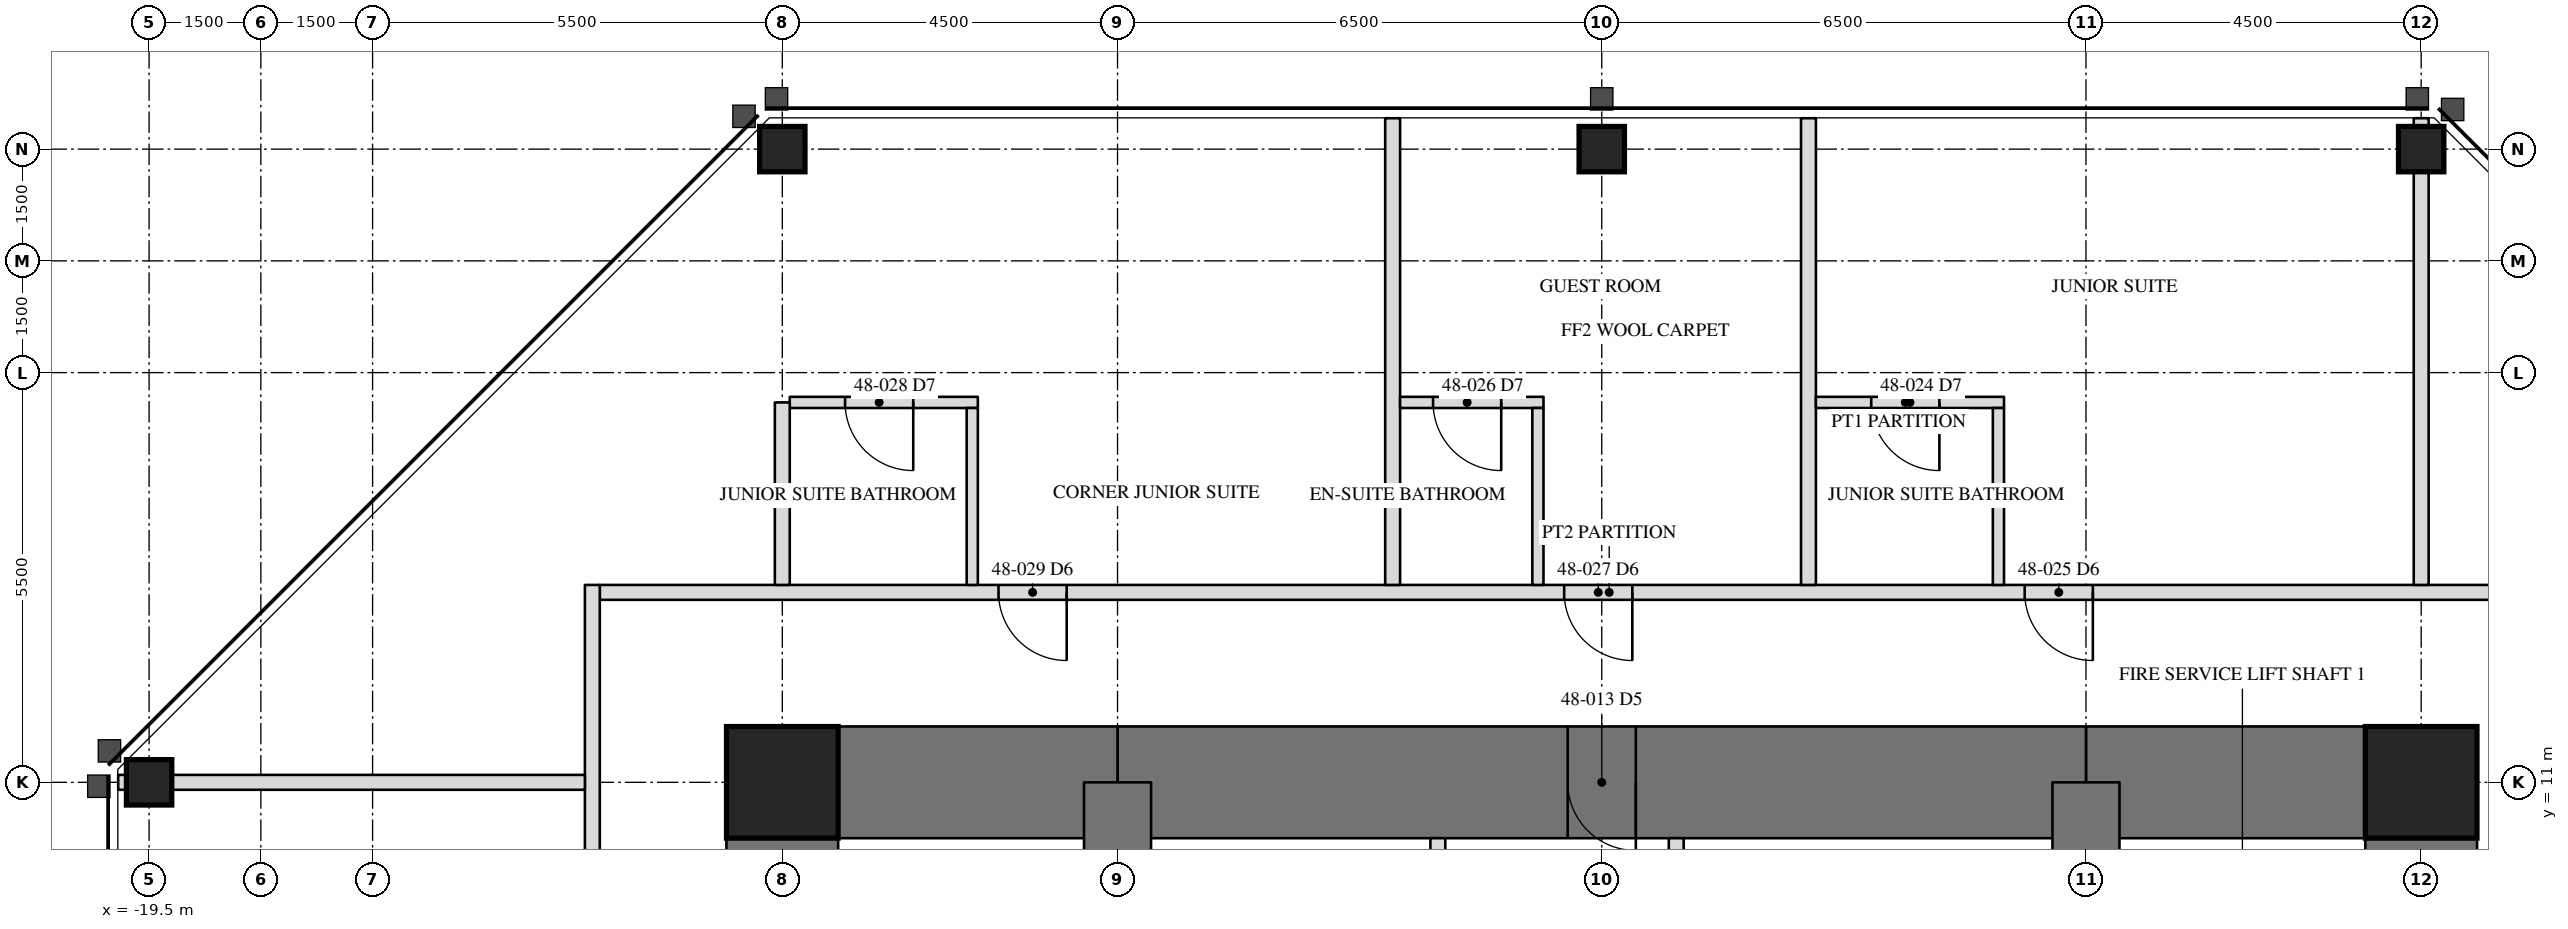
"""IFC4 building model, lengths in metres.
Left out: names, types, materials, properties, quantities, classifications, styles, units other than length and angle.
Written with IfcOpenShell. Run it as: python <this file> out.ifc"""

import sys

from ifc_helpers import new_model, si_unit, direction, frame, frame_2d, origin, origin_2d, place, context, subcontext, project, spatial, rectangle, hollow_rectangle, extrude, element, fill, save


model = new_model("IFC4")
c1 = context("Model", 3, precision=1e-05, world=origin(), true_north=direction((0.0, 1.0)))
c2 = subcontext(c1, "Body", "Model", "MODEL_VIEW")
j1 = project(units=[si_unit("LENGTHUNIT", "METRE"), si_unit("PLANEANGLEUNIT", "RADIAN")], contexts=[c1])
p1 = place(None, origin())
s1 = spatial("IfcSite", under=j1, at=p1, CompositionType="ELEMENT")
p2 = place(p1, origin())
s2 = spatial("IfcBuilding", under=s1, at=p2, CompositionType="ELEMENT")
p3 = place(p2, frame((0.0, 0.0, 204.7)))
s3 = spatial("IfcBuildingStorey", under=s2, at=p3, CompositionType="ELEMENT", Elevation=204.7)
for number, where, z_axis, x_axis in (
    (1, (11.0, 19.5, 0.0), (0.0, 0.0, 1.0), (1.0, 0.0, 0.0)),
    (2, (0.0, 19.5, 0.0), (0.0, 0.0, 1.0), (1.0, 0.0, 0.0)),
    (3, (-11.0, 19.5, 0.0), (0.0, 0.0, 1.0), (1.0, 0.0, 0.0)),
    (4, (-19.5, 11.0, 0.0), (0.0, 0.0, 1.0), (0.0, 1.0, 0.0)),
):
    element("IfcColumn", number, at=place(p3, frame(where, z_axis=z_axis, x_axis=x_axis)), inside=s3, PredefinedType="COLUMN", context=c2, shape_type="SweptSolid", body=[
        extrude(hollow_rectangle(XDim=0.61, YDim=0.61, WallThickness=0.076, at=origin_2d()), origin(), (0.0, 0.0, 1.0), 3.5),
    ])
p4 = place(p3, frame((11.0, -11.0, 0.0), z_axis=(0.0, 0.0, 1.0), x_axis=(0.0, 1.0, 0.0)))
e5 = element("IfcWall", 5, at=p4, inside=s3, PredefinedType="SHEAR", context=c2, shape_type="SweptSolid", body=[
    extrude(rectangle(XDim=22.0, YDim=1.5, at=frame_2d((11.0, 0.0))), origin(), (0.0, 0.0, 1.0), 3.5),
])
p5 = place(p4, frame((15.393, 0.0, 0.0)))
e6 = element("IfcOpeningElement", 6, at=p5, cuts=e5, PredefinedType="OPENING", context=c2, shape_type="SweptSolid", body=[
    extrude(rectangle(XDim=0.915, YDim=2.134, at=frame_2d((0.458, 1.067))), frame((0.0, 0.76, 0.0), z_axis=(0.0, -1.0, 0.0), x_axis=(1.0, 0.0, 0.0)), (0.0, 0.0, 1.0), 1.52),
])
p6 = place(p3, frame((-11.0, 11.0, 0.0), z_axis=(0.0, 0.0, 1.0), x_axis=(0.0, -1.0, 0.0)))
e7 = element("IfcWall", 7, at=p6, inside=s3, PredefinedType="SHEAR", context=c2, shape_type="SweptSolid", body=[
    extrude(rectangle(XDim=22.0, YDim=1.5, at=frame_2d((11.0, 0.0))), origin(), (0.0, 0.0, 1.0), 3.5),
])
p7 = place(p6, frame((15.393, 0.0, 0.0)))
e8 = element("IfcOpeningElement", 8, at=p7, cuts=e7, PredefinedType="OPENING", context=c2, shape_type="SweptSolid", body=[
    extrude(rectangle(XDim=0.915, YDim=2.134, at=frame_2d((0.458, 1.067))), frame((0.0, 0.76, 0.0), z_axis=(0.0, -1.0, 0.0), x_axis=(1.0, 0.0, 0.0)), (0.0, 0.0, 1.0), 1.52),
])
p8 = place(p3, frame((11.0, 11.0, 0.0), z_axis=(0.0, 0.0, 1.0), x_axis=(-1.0, 0.0, 0.0)))
e9 = element("IfcWall", 9, at=p8, inside=s3, PredefinedType="SHEAR", context=c2, shape_type="SweptSolid", body=[
    extrude(rectangle(XDim=4.5, YDim=1.5, at=frame_2d((2.25, 0.0))), origin(), (0.0, 0.0, 1.0), 3.5),
])
p9 = place(p3, frame((6.5, 11.0, 0.0), z_axis=(0.0, 0.0, 1.0), x_axis=(-1.0, 0.0, 0.0)))
e10 = element("IfcWall", 10, at=p9, inside=s3, PredefinedType="SHEAR", context=c2, shape_type="SweptSolid", body=[
    extrude(rectangle(XDim=13.0, YDim=1.5, at=frame_2d((6.5, 0.0))), origin(), (0.0, 0.0, 1.0), 3.5),
])
p10 = place(p9, frame((6.042, 0.0, 0.0)))
e11 = element("IfcOpeningElement", 11, at=p10, cuts=e10, PredefinedType="OPENING", context=c2, shape_type="SweptSolid", body=[
    extrude(rectangle(XDim=0.915, YDim=2.134, at=frame_2d((0.458, 1.067))), frame((0.0, 0.76, 0.0), z_axis=(0.0, -1.0, 0.0), x_axis=(1.0, 0.0, 0.0)), (0.0, 0.0, 1.0), 1.52),
])
p11 = place(p3, frame((-6.5, 11.0, 0.0), z_axis=(0.0, 0.0, 1.0), x_axis=(-1.0, 0.0, 0.0)))
e12 = element("IfcWall", 12, at=p11, inside=s3, PredefinedType="SHEAR", context=c2, shape_type="SweptSolid", body=[
    extrude(rectangle(XDim=4.5, YDim=1.5, at=frame_2d((2.25, 0.0))), origin(), (0.0, 0.0, 1.0), 3.5),
])
for number, where, z_axis, x_axis in (
    (13, (6.5, 6.5, 0.0), (0.0, 0.0, 1.0), (0.0, 1.0, 0.0)),
    (14, (-6.5, 11.0, 0.0), (0.0, 0.0, 1.0), (0.0, -1.0, 0.0)),
):
    element("IfcWall", number, at=place(p3, frame(where, z_axis=z_axis, x_axis=x_axis)), inside=s3, PredefinedType="SHEAR", context=c2, shape_type="SweptSolid", body=[
        extrude(rectangle(XDim=4.5, YDim=0.9, at=frame_2d((2.25, 0.0))), origin(), (0.0, 0.0, 1.0), 3.5),
    ])
for number, where, z_axis, x_axis in (
    (15, (11.0, 11.0, 0.0), (0.0, 0.0, 1.0), (1.0, 0.0, 0.0)),
    (16, (-11.0, 11.0, 0.0), (0.0, 0.0, 1.0), (1.0, 0.0, 0.0)),
):
    element("IfcColumn", number, at=place(p3, frame(where, z_axis=z_axis, x_axis=x_axis)), inside=s3, PredefinedType="COLUMN", context=c2, shape_type="SweptSolid", body=[
        extrude(hollow_rectangle(XDim=1.499, YDim=1.499, WallThickness=0.102, at=origin_2d()), origin(), (0.0, 0.0, 1.0), 3.5),
    ])
p12 = place(p3, frame((-2.2, 6.95, 0.0), z_axis=(0.0, 0.0, 1.0), x_axis=(0.0, 1.0, 0.0)))
e17 = element("IfcWall", 17, at=p12, inside=s3, PredefinedType="PARTITIONING", context=c2, shape_type="SweptSolid", body=[
    extrude(rectangle(XDim=3.3, YDim=0.2, at=frame_2d((1.65, 0.0))), origin(), (0.0, 0.0, 1.0), 3.31),
])
p13 = place(p12, frame((1.192, 0.0, 0.0)))
e18 = element("IfcOpeningElement", 18, at=p13, cuts=e17, PredefinedType="OPENING", context=c2, shape_type="SweptSolid", body=[
    extrude(rectangle(XDim=0.915, YDim=2.134, at=frame_2d((0.458, 1.067))), frame((0.0, 0.11, 0.0), z_axis=(0.0, -1.0, 0.0), x_axis=(1.0, 0.0, 0.0)), (0.0, 0.0, 1.0), 0.22),
])
p14 = place(p3, frame((1.0, 6.95, 0.0), z_axis=(0.0, 0.0, 1.0), x_axis=(0.0, 1.0, 0.0)))
e19 = element("IfcWall", 19, at=p14, inside=s3, PredefinedType="PARTITIONING", context=c2, shape_type="SweptSolid", body=[
    extrude(rectangle(XDim=3.3, YDim=0.2, at=frame_2d((1.65, 0.0))), origin(), (0.0, 0.0, 1.0), 3.31),
])
p15 = place(p14, frame((1.192, 0.0, 0.0)))
e20 = element("IfcOpeningElement", 20, at=p15, cuts=e19, PredefinedType="OPENING", context=c2, shape_type="SweptSolid", body=[
    extrude(rectangle(XDim=0.915, YDim=2.134, at=frame_2d((0.458, 1.067))), frame((0.0, 0.11, 0.0), z_axis=(0.0, -1.0, 0.0), x_axis=(1.0, 0.0, 0.0)), (0.0, 0.0, 1.0), 0.22),
])
p16 = place(p3, frame((13.65, 13.55, 0.0), z_axis=(0.0, 0.0, 1.0), x_axis=(-1.0, 0.0, 0.0)))
e21 = element("IfcWall", 21, at=p16, inside=s3, PredefinedType="PARTITIONING", context=c2, shape_type="SweptSolid", body=[
    extrude(rectangle(XDim=27.1, YDim=0.2, at=frame_2d((13.55, 0.0))), origin(), (0.0, 0.0, 1.0), 3.31),
])
p17 = place(p16, frame((7.058, 0.0, 0.0)))
e22 = element("IfcOpeningElement", 22, at=p17, cuts=e21, PredefinedType="OPENING", context=c2, shape_type="SweptSolid", body=[
    extrude(rectangle(XDim=0.915, YDim=2.134, at=frame_2d((0.458, 1.067))), frame((0.0, 0.11, 0.0), z_axis=(0.0, -1.0, 0.0), x_axis=(1.0, 0.0, 0.0)), (0.0, 0.0, 1.0), 0.22),
])
p18 = place(p16, frame((13.24, 0.0, 0.0)))
e23 = element("IfcOpeningElement", 23, at=p18, cuts=e21, PredefinedType="OPENING", context=c2, shape_type="SweptSolid", body=[
    extrude(rectangle(XDim=0.915, YDim=2.134, at=frame_2d((0.458, 1.067))), frame((0.0, 0.11, 0.0), z_axis=(0.0, -1.0, 0.0), x_axis=(1.0, 0.0, 0.0)), (0.0, 0.0, 1.0), 0.22),
])
p19 = place(p16, frame((20.833, 0.0, 0.0)))
e24 = element("IfcOpeningElement", 24, at=p19, cuts=e21, PredefinedType="OPENING", context=c2, shape_type="SweptSolid", body=[
    extrude(rectangle(XDim=0.915, YDim=2.134, at=frame_2d((0.458, 1.067))), frame((0.0, 0.11, 0.0), z_axis=(0.0, -1.0, 0.0), x_axis=(1.0, 0.0, 0.0)), (0.0, 0.0, 1.0), 0.22),
])
p20 = place(p3, frame((-13.55, 13.65, 0.0), z_axis=(0.0, 0.0, 1.0), x_axis=(0.0, -1.0, 0.0)))
e25 = element("IfcWall", 25, at=p20, inside=s3, PredefinedType="PARTITIONING", context=c2, shape_type="SweptSolid", body=[
    extrude(rectangle(XDim=27.1, YDim=0.2, at=frame_2d((13.55, 0.0))), origin(), (0.0, 0.0, 1.0), 3.31),
])
p21 = place(p20, frame((4.884, 0.0, 0.0)))
e26 = element("IfcOpeningElement", 26, at=p21, cuts=e25, PredefinedType="OPENING", context=c2, shape_type="SweptSolid", body=[
    extrude(rectangle(XDim=0.915, YDim=2.134, at=frame_2d((0.458, 1.067))), frame((0.0, 0.11, 0.0), z_axis=(0.0, -1.0, 0.0), x_axis=(1.0, 0.0, 0.0)), (0.0, 0.0, 1.0), 0.22),
])
p22 = place(p20, frame((10.433, 0.0, 0.0)))
e27 = element("IfcOpeningElement", 27, at=p22, cuts=e25, PredefinedType="OPENING", context=c2, shape_type="SweptSolid", body=[
    extrude(rectangle(XDim=0.915, YDim=2.134, at=frame_2d((0.458, 1.067))), frame((0.0, 0.11, 0.0), z_axis=(0.0, -1.0, 0.0), x_axis=(1.0, 0.0, 0.0)), (0.0, 0.0, 1.0), 0.22),
])
p23 = place(p20, frame((16.046, 0.0, 0.0)))
e28 = element("IfcOpeningElement", 28, at=p23, cuts=e25, PredefinedType="OPENING", context=c2, shape_type="SweptSolid", body=[
    extrude(rectangle(XDim=0.915, YDim=2.134, at=frame_2d((0.458, 1.067))), frame((0.0, 0.11, 0.0), z_axis=(0.0, -1.0, 0.0), x_axis=(1.0, 0.0, 0.0)), (0.0, 0.0, 1.0), 0.22),
])
p24 = place(p20, frame((21.433, 0.0, 0.0)))
e29 = element("IfcOpeningElement", 29, at=p24, cuts=e25, PredefinedType="OPENING", context=c2, shape_type="SweptSolid", body=[
    extrude(rectangle(XDim=0.915, YDim=2.134, at=frame_2d((0.458, 1.067))), frame((0.0, 0.11, 0.0), z_axis=(0.0, -1.0, 0.0), x_axis=(1.0, 0.0, 0.0)), (0.0, 0.0, 1.0), 0.22),
])
p25 = place(p3, frame((11.0, 13.65, 0.0), z_axis=(0.0, 0.0, 1.0), x_axis=(0.0, 1.0, 0.0)))
e30 = element("IfcWall", 30, at=p25, inside=s3, PredefinedType="PARTITIONING", context=c2, shape_type="SweptSolid", body=[
    extrude(rectangle(XDim=6.265, YDim=0.2, at=frame_2d((3.133, 0.0))), origin(), (0.0, 0.0, 1.0), 2.802),
])
for number, where, z_axis, x_axis in (
    (31, (2.775, 13.65, 0.0), (0.0, 0.0, 1.0), (0.0, 1.0, 0.0)),
    (32, (-2.807, 13.65, 0.0), (0.0, 0.0, 1.0), (0.0, 1.0, 0.0)),
):
    element("IfcWall", number, at=place(p3, frame(where, z_axis=z_axis, x_axis=x_axis)), inside=s3, PredefinedType="PARTITIONING", context=c2, shape_type="SweptSolid", body=[
        extrude(rectangle(XDim=6.265, YDim=0.2, at=frame_2d((3.133, 0.0))), origin(), (0.0, 0.0, 1.0), 3.31),
    ])
p26 = place(p3, frame((5.4, 16.1, 0.0), z_axis=(0.0, 0.0, 1.0), x_axis=(-1.0, 0.0, 0.0)))
e33 = element("IfcWall", 33, at=p26, inside=s3, PredefinedType="PARTITIONING", context=c2, shape_type="SweptSolid", body=[
    extrude(rectangle(XDim=2.525, YDim=0.15, at=frame_2d((1.262, 0.0))), origin(), (0.0, 0.0, 1.0), 3.31),
])
p27 = place(p26, frame((0.867, 0.0, 0.0)))
e34 = element("IfcOpeningElement", 34, at=p27, cuts=e33, PredefinedType="OPENING", context=c2, shape_type="SweptSolid", body=[
    extrude(rectangle(XDim=0.915, YDim=2.032, at=frame_2d((0.458, 1.016))), frame((0.0, 0.085, 0.0), z_axis=(0.0, -1.0, 0.0), x_axis=(1.0, 0.0, 0.0)), (0.0, 0.0, 1.0), 0.17),
])
p28 = place(p3, frame((5.325, 13.65, 0.0), z_axis=(0.0, 0.0, 1.0), x_axis=(0.0, 1.0, 0.0)))
e35 = element("IfcWall", 35, at=p28, inside=s3, PredefinedType="PARTITIONING", context=c2, shape_type="SweptSolid", body=[
    extrude(rectangle(XDim=2.375, YDim=0.15, at=frame_2d((1.188, 0.0))), origin(), (0.0, 0.0, 1.0), 3.31),
])
p29 = place(p3, frame((-0.782, 16.1, 0.0), z_axis=(0.0, 0.0, 1.0), x_axis=(-1.0, 0.0, 0.0)))
e36 = element("IfcWall", 36, at=p29, inside=s3, PredefinedType="PARTITIONING", context=c2, shape_type="SweptSolid", body=[
    extrude(rectangle(XDim=1.925, YDim=0.15, at=frame_2d((0.962, 0.0))), origin(), (0.0, 0.0, 1.0), 3.31),
])
p30 = place(p29, frame((0.567, 0.0, 0.0)))
e37 = element("IfcOpeningElement", 37, at=p30, cuts=e36, PredefinedType="OPENING", context=c2, shape_type="SweptSolid", body=[
    extrude(rectangle(XDim=0.915, YDim=2.032, at=frame_2d((0.458, 1.016))), frame((0.0, 0.085, 0.0), z_axis=(0.0, -1.0, 0.0), x_axis=(1.0, 0.0, 0.0)), (0.0, 0.0, 1.0), 0.17),
])
p31 = place(p3, frame((-0.857, 13.65, 0.0), z_axis=(0.0, 0.0, 1.0), x_axis=(0.0, 1.0, 0.0)))
e38 = element("IfcWall", 38, at=p31, inside=s3, PredefinedType="PARTITIONING", context=c2, shape_type="SweptSolid", body=[
    extrude(rectangle(XDim=2.375, YDim=0.15, at=frame_2d((1.188, 0.0))), origin(), (0.0, 0.0, 1.0), 3.31),
])
p32 = place(p3, frame((-8.375, 16.1, 0.0), z_axis=(0.0, 0.0, 1.0), x_axis=(-1.0, 0.0, 0.0)))
e39 = element("IfcWall", 39, at=p32, inside=s3, PredefinedType="PARTITIONING", context=c2, shape_type="SweptSolid", body=[
    extrude(rectangle(XDim=2.525, YDim=0.15, at=frame_2d((1.262, 0.0))), origin(), (0.0, 0.0, 1.0), 3.31),
])
p33 = place(p32, frame((0.867, 0.0, 0.0)))
e40 = element("IfcOpeningElement", 40, at=p33, cuts=e39, PredefinedType="OPENING", context=c2, shape_type="SweptSolid", body=[
    extrude(rectangle(XDim=0.915, YDim=2.032, at=frame_2d((0.458, 1.016))), frame((0.0, 0.085, 0.0), z_axis=(0.0, -1.0, 0.0), x_axis=(1.0, 0.0, 0.0)), (0.0, 0.0, 1.0), 0.17),
])
p34 = place(p3, frame((-8.45, 13.65, 0.0), z_axis=(0.0, 0.0, 1.0), x_axis=(0.0, 1.0, 0.0)))
e41 = element("IfcWall", 41, at=p34, inside=s3, PredefinedType="PARTITIONING", context=c2, shape_type="SweptSolid", body=[
    extrude(rectangle(XDim=2.375, YDim=0.15, at=frame_2d((1.188, 0.0))), origin(), (0.0, 0.0, 1.0), 3.31),
])
p35 = place(p3, frame((-11.0, 13.65, 0.0), z_axis=(0.0, 0.0, 1.0), x_axis=(0.0, 1.0, 0.0)))
e42 = element("IfcWall", 42, at=p35, inside=s3, PredefinedType="PARTITIONING", context=c2, shape_type="SweptSolid", body=[
    extrude(rectangle(XDim=2.45, YDim=0.2, at=frame_2d((1.225, 0.0))), origin(), (0.0, 0.0, 1.0), 2.802),
])
p36 = place(p3, frame((-13.65, 11.0, 0.0), z_axis=(0.0, 0.0, 1.0), x_axis=(-1.0, 0.0, 0.0)))
e43 = element("IfcWall", 43, at=p36, inside=s3, PredefinedType="PARTITIONING", context=c2, shape_type="SweptSolid", body=[
    extrude(rectangle(XDim=6.265, YDim=0.2, at=frame_2d((3.133, 0.0))), origin(), (0.0, 0.0, 1.0), 2.802),
])
p37 = place(p10, origin())
e44 = element("IfcDoor", 44, at=p37, inside=s3, OperationType="SINGLE_SWING_RIGHT", PredefinedType="DOOR", context=c2, shape_type="SweptSolid", body=[
    extrude(rectangle(XDim=0.915, YDim=2.134, at=frame_2d((0.458, 1.067))), frame((0.0, 0.025, 0.0), z_axis=(0.0, -1.0, 0.0), x_axis=(1.0, 0.0, 0.0)), (0.0, 0.0, 1.0), 0.05),
])
fill(e11, e44)
p38 = place(p27, origin())
e45 = element("IfcDoor", 45, at=p38, inside=s3, OperationType="SINGLE_SWING_LEFT", PredefinedType="DOOR", context=c2, shape_type="SweptSolid", body=[
    extrude(rectangle(XDim=0.915, YDim=2.032, at=frame_2d((0.458, 1.016))), frame((0.0, 0.025, 0.0), z_axis=(0.0, -1.0, 0.0), x_axis=(1.0, 0.0, 0.0)), (0.0, 0.0, 1.0), 0.05),
])
fill(e34, e45)
p39 = place(p17, origin())
e46 = element("IfcDoor", 46, at=p39, inside=s3, OperationType="SINGLE_SWING_LEFT", PredefinedType="DOOR", context=c2, shape_type="SweptSolid", body=[
    extrude(rectangle(XDim=0.915, YDim=2.134, at=frame_2d((0.458, 1.067))), frame((0.0, 0.025, 0.0), z_axis=(0.0, -1.0, 0.0), x_axis=(1.0, 0.0, 0.0)), (0.0, 0.0, 1.0), 0.05),
])
fill(e22, e46)
p40 = place(p30, origin())
e47 = element("IfcDoor", 47, at=p40, inside=s3, OperationType="SINGLE_SWING_LEFT", PredefinedType="DOOR", context=c2, shape_type="SweptSolid", body=[
    extrude(rectangle(XDim=0.915, YDim=2.032, at=frame_2d((0.458, 1.016))), frame((0.0, 0.025, 0.0), z_axis=(0.0, -1.0, 0.0), x_axis=(1.0, 0.0, 0.0)), (0.0, 0.0, 1.0), 0.05),
])
fill(e37, e47)
p41 = place(p18, origin())
e48 = element("IfcDoor", 48, at=p41, inside=s3, OperationType="SINGLE_SWING_LEFT", PredefinedType="DOOR", context=c2, shape_type="SweptSolid", body=[
    extrude(rectangle(XDim=0.915, YDim=2.134, at=frame_2d((0.458, 1.067))), frame((0.0, 0.025, 0.0), z_axis=(0.0, -1.0, 0.0), x_axis=(1.0, 0.0, 0.0)), (0.0, 0.0, 1.0), 0.05),
])
fill(e23, e48)
p42 = place(p33, origin())
e49 = element("IfcDoor", 49, at=p42, inside=s3, OperationType="SINGLE_SWING_LEFT", PredefinedType="DOOR", context=c2, shape_type="SweptSolid", body=[
    extrude(rectangle(XDim=0.915, YDim=2.032, at=frame_2d((0.458, 1.016))), frame((0.0, 0.025, 0.0), z_axis=(0.0, -1.0, 0.0), x_axis=(1.0, 0.0, 0.0)), (0.0, 0.0, 1.0), 0.05),
])
fill(e40, e49)
p43 = place(p19, origin())
e50 = element("IfcDoor", 50, at=p43, inside=s3, OperationType="SINGLE_SWING_LEFT", PredefinedType="DOOR", context=c2, shape_type="SweptSolid", body=[
    extrude(rectangle(XDim=0.915, YDim=2.134, at=frame_2d((0.458, 1.067))), frame((0.0, 0.025, 0.0), z_axis=(0.0, -1.0, 0.0), x_axis=(1.0, 0.0, 0.0)), (0.0, 0.0, 1.0), 0.05),
])
fill(e24, e50)
save(model, sys.argv[1])
